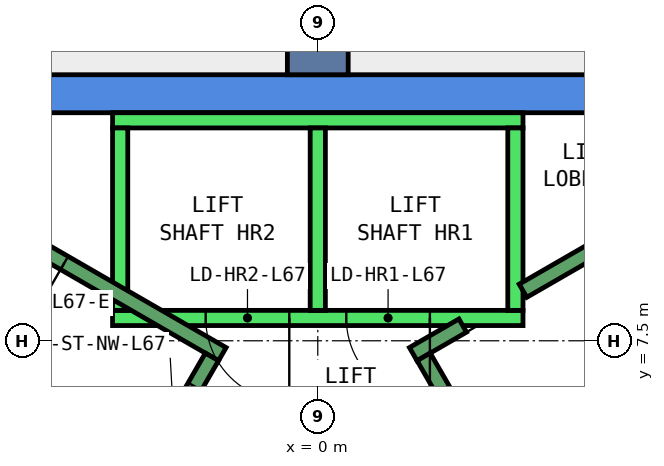
"""IFC4 building model, lengths in metres.
Left out: names, types, materials, properties, quantities, classifications, styles, units other than length and angle.
Written with IfcOpenShell. Run it as: python <this file> out.ifc"""

import sys

from ifc_helpers import new_model, si_unit, direction, frame, frame_2d, origin, place, context, subcontext, project, spatial, polyline, rectangle, outline, extrude, element, fill, save


model = new_model("IFC4")
c1 = context("Model", 3, precision=1e-05, world=origin(), true_north=direction((0.0, 1.0)))
c2 = subcontext(c1, "Body", "Model", "MODEL_VIEW")
j1 = project(units=[si_unit("LENGTHUNIT", "METRE"), si_unit("PLANEANGLEUNIT", "RADIAN")], contexts=[c1])
p1 = place(None, origin())
s1 = spatial("IfcSite", under=j1, at=p1, CompositionType="ELEMENT")
p2 = place(p1, origin())
s2 = spatial("IfcBuilding", under=s1, at=p2, CompositionType="ELEMENT")
p3 = place(p2, frame((0.0, 0.0, 290.0)))
s3 = spatial("IfcBuildingStorey", under=s2, at=p3, CompositionType="ELEMENT", Elevation=290.0)
p4 = place(p3, frame((0.0, 0.0, -0.34)))
e1 = element("IfcWall", 1, at=p4, inside=s3, PredefinedType="SHEAR", context=c2, shape_type="SweptSolid", body=[
    extrude(outline(polyline([(4.907, 11.0), (-4.907, 11.0), (-4.619, 10.5), (4.619, 10.5), (4.907, 11.0)])), origin(), (0.0, 0.0, 1.0), 3.6),
])
p5 = place(p3, frame((0.0, 11.0, -0.34), z_axis=(0.0, 0.0, 1.0), x_axis=(0.0, 1.0, 0.0)))
e2 = element("IfcWall", 2, at=p5, inside=s3, PredefinedType="SHEAR", context=c2, shape_type="SweptSolid", body=[
    extrude(rectangle(XDim=9.0, YDim=0.8, at=frame_2d((4.5, 0.0))), origin(), (0.0, 0.0, 1.0), 3.6),
])
p6 = place(p3, frame((2.62, 14.526, 0.0), z_axis=(0.0, 0.0, 1.0), x_axis=(0.527726136463, -0.84941457775, 0.0)))
e3 = element("IfcWall", 3, at=p6, inside=s3, PredefinedType="PARTITIONING", context=c2, shape_type="SweptSolid", body=[
    extrude(rectangle(XDim=4.165, YDim=0.2, at=frame_2d((2.083, 0.0))), origin(), (0.0, 0.0, 1.0), 2.4),
])
p7 = place(p6, frame((1.583, 0.0, 0.0)))
e4 = element("IfcOpeningElement", 4, at=p7, cuts=e3, PredefinedType="OPENING", context=c2, shape_type="SweptSolid", body=[
    extrude(rectangle(XDim=1.0, YDim=2.1, at=frame_2d((0.5, 1.05))), frame((0.0, 0.11, 0.0), z_axis=(0.0, -1.0, 0.0), x_axis=(1.0, 0.0, 0.0)), (0.0, 0.0, 1.0), 0.22),
])
p8 = place(p3, frame((2.7, 7.8, 0.0), z_axis=(0.0, 0.0, 1.0), x_axis=(-1.0, 0.0, 0.0)))
e5 = element("IfcWall", 5, at=p8, inside=s3, PredefinedType="STANDARD", context=c2, shape_type="SweptSolid", body=[
    extrude(rectangle(XDim=5.4, YDim=0.2, at=frame_2d((2.7, 0.0))), origin(), (0.0, 0.0, 1.0), 3.26),
])
p9 = place(p8, frame((1.225, 0.0, 0.0)))
e6 = element("IfcOpeningElement", 6, at=p9, cuts=e5, PredefinedType="OPENING", context=c2, shape_type="SweptSolid", body=[
    extrude(rectangle(XDim=1.1, YDim=2.1, at=frame_2d((0.55, 1.05))), frame((0.0, 0.11, 0.0), z_axis=(0.0, -1.0, 0.0), x_axis=(1.0, 0.0, 0.0)), (0.0, 0.0, 1.0), 0.22),
])
p10 = place(p8, frame((3.075, 0.0, 0.0)))
e7 = element("IfcOpeningElement", 7, at=p10, cuts=e5, PredefinedType="OPENING", context=c2, shape_type="SweptSolid", body=[
    extrude(rectangle(XDim=1.1, YDim=2.1, at=frame_2d((0.55, 1.05))), frame((0.0, 0.11, 0.0), z_axis=(0.0, -1.0, 0.0), x_axis=(1.0, 0.0, 0.0)), (0.0, 0.0, 1.0), 0.22),
])
p11 = place(p3, frame((2.7, 10.4, 0.0), z_axis=(0.0, 0.0, 1.0), x_axis=(-1.0, 0.0, 0.0)))
e8 = element("IfcWall", 8, at=p11, inside=s3, PredefinedType="STANDARD", context=c2, shape_type="SweptSolid", body=[
    extrude(rectangle(XDim=5.4, YDim=0.2, at=frame_2d((2.7, 0.0))), origin(), (0.0, 0.0, 1.0), 3.26),
])
for number, where, z_axis, x_axis in (
    (9, (2.6, 7.9, 0.0), (0.0, 0.0, 1.0), (0.0, 1.0, 0.0)),
    (10, (0.0, 7.9, 0.0), (0.0, 0.0, 1.0), (0.0, 1.0, 0.0)),
    (11, (-2.6, 7.9, 0.0), (0.0, 0.0, 1.0), (0.0, 1.0, 0.0)),
):
    element("IfcWall", number, at=place(p3, frame(where, z_axis=z_axis, x_axis=x_axis)), inside=s3, PredefinedType="STANDARD", context=c2, shape_type="SweptSolid", body=[
        extrude(rectangle(XDim=2.4, YDim=0.2, at=frame_2d((1.2, 0.0))), origin(), (0.0, 0.0, 1.0), 3.26),
    ])
p12 = place(p3, frame((2.7, 8.158, 0.0), z_axis=(0.0, 0.0, 1.0), x_axis=(0.86611865017, 0.499838457731, 0.0)))
e12 = element("IfcWall", 12, at=p12, inside=s3, PredefinedType="STANDARD", context=c2, shape_type="SweptSolid", body=[
    extrude(rectangle(XDim=2.733, YDim=0.2, at=frame_2d((1.366, 0.0))), origin(), (0.0, 0.0, 1.0), 3.26),
])
p13 = place(p3, frame((1.256, 7.324, 0.0), z_axis=(0.0, 0.0, 1.0), x_axis=(0.865915093549, 0.500191014278, 0.0)))
e13 = element("IfcWall", 13, at=p13, inside=s3, PredefinedType="STANDARD", context=c2, shape_type="SweptSolid", body=[
    extrude(rectangle(XDim=0.752, YDim=0.2, at=frame_2d((0.376, 0.0))), origin(), (0.0, 0.0, 1.0), 3.26),
])
p14 = place(p3, frame((4.843, 1.312, 0.0), z_axis=(0.0, 0.0, 1.0), x_axis=(-0.499963383562, 0.866046543262, 0.0)))
e14 = element("IfcWall", 14, at=p14, inside=s3, PredefinedType="STANDARD", context=c2, shape_type="SweptSolid", body=[
    extrude(rectangle(XDim=6.9, YDim=0.2, at=frame_2d((3.45, 0.0))), origin(), (0.0, 0.0, 1.0), 3.26),
])
p15 = place(p14, frame((0.45, 0.0, 0.0)))
e15 = element("IfcOpeningElement", 15, at=p15, cuts=e14, PredefinedType="OPENING", context=c2, shape_type="SweptSolid", body=[
    extrude(rectangle(XDim=1.1, YDim=2.2, at=frame_2d((0.55, 1.1))), frame((0.0, 0.11, 0.0), z_axis=(0.0, -1.0, 0.0), x_axis=(1.0, 0.0, 0.0)), (0.0, 0.0, 1.0), 0.22),
])
p16 = place(p3, frame((-1.256, 7.324, 0.0), z_axis=(0.0, 0.0, 1.0), x_axis=(-0.866046073146, 0.499964197906, 0.0)))
e16 = element("IfcWall", 16, at=p16, inside=s3, PredefinedType="STANDARD", context=c2, shape_type="SweptSolid", body=[
    extrude(rectangle(XDim=4.4, YDim=0.2, at=frame_2d((2.2, 0.0))), origin(), (0.0, 0.0, 1.0), 3.26),
])
p17 = place(p16, frame((2.4, 0.0, 0.0)))
e17 = element("IfcOpeningElement", 17, at=p17, cuts=e16, PredefinedType="OPENING", context=c2, shape_type="SweptSolid", body=[
    extrude(rectangle(XDim=1.1, YDim=2.2, at=frame_2d((0.55, 1.1))), frame((0.0, 0.11, 0.0), z_axis=(0.0, -1.0, 0.0), x_axis=(1.0, 0.0, 0.0)), (0.0, 0.0, 1.0), 0.22),
])
p18 = place(p3, frame((-1.393, 7.288, 0.0), z_axis=(0.0, 0.0, 1.0), x_axis=(-0.499963383562, -0.866046543262, 0.0)))
e18 = element("IfcWall", 18, at=p18, inside=s3, PredefinedType="STANDARD", context=c2, shape_type="SweptSolid", body=[
    extrude(rectangle(XDim=6.9, YDim=0.2, at=frame_2d((3.45, 0.0))), origin(), (0.0, 0.0, 1.0), 3.26),
])
p19 = place(p18, frame((0.45, 0.0, 0.0)))
e19 = element("IfcOpeningElement", 19, at=p19, cuts=e18, PredefinedType="OPENING", context=c2, shape_type="SweptSolid", body=[
    extrude(rectangle(XDim=1.1, YDim=2.2, at=frame_2d((0.55, 1.1))), frame((0.0, 0.11, 0.0), z_axis=(0.0, -1.0, 0.0), x_axis=(1.0, 0.0, 0.0)), (0.0, 0.0, 1.0), 0.22),
])
p20 = place(p9, origin())
e20 = element("IfcDoor", 20, at=p20, inside=s3, OperationType="SLIDING_TO_LEFT", PredefinedType="DOOR", context=c2, shape_type="SweptSolid", body=[
    extrude(rectangle(XDim=1.1, YDim=2.1, at=frame_2d((0.55, 1.05))), frame((0.0, 0.025, 0.0), z_axis=(0.0, -1.0, 0.0), x_axis=(1.0, 0.0, 0.0)), (0.0, 0.0, 1.0), 0.05),
])
fill(e6, e20)
p21 = place(p10, origin())
e21 = element("IfcDoor", 21, at=p21, inside=s3, OperationType="SLIDING_TO_LEFT", PredefinedType="DOOR", context=c2, shape_type="SweptSolid", body=[
    extrude(rectangle(XDim=1.1, YDim=2.1, at=frame_2d((0.55, 1.05))), frame((0.0, 0.025, 0.0), z_axis=(0.0, -1.0, 0.0), x_axis=(1.0, 0.0, 0.0)), (0.0, 0.0, 1.0), 0.05),
])
fill(e7, e21)
p22 = place(p19, origin())
e22 = element("IfcDoor", 22, at=p22, inside=s3, OperationType="SINGLE_SWING_LEFT", PredefinedType="DOOR", context=c2, shape_type="SweptSolid", body=[
    extrude(rectangle(XDim=1.1, YDim=2.2, at=frame_2d((0.55, 1.1))), frame((0.0, 0.025, 0.0), z_axis=(0.0, -1.0, 0.0), x_axis=(1.0, 0.0, 0.0)), (0.0, 0.0, 1.0), 0.05),
])
fill(e19, e22)
p23 = place(p17, origin())
e23 = element("IfcDoor", 23, at=p23, inside=s3, OperationType="SINGLE_SWING_LEFT", PredefinedType="DOOR", context=c2, shape_type="SweptSolid", body=[
    extrude(rectangle(XDim=1.1, YDim=2.2, at=frame_2d((0.55, 1.1))), frame((0.0, 0.025, 0.0), z_axis=(0.0, -1.0, 0.0), x_axis=(1.0, 0.0, 0.0)), (0.0, 0.0, 1.0), 0.05),
])
fill(e17, e23)
save(model, sys.argv[1])
